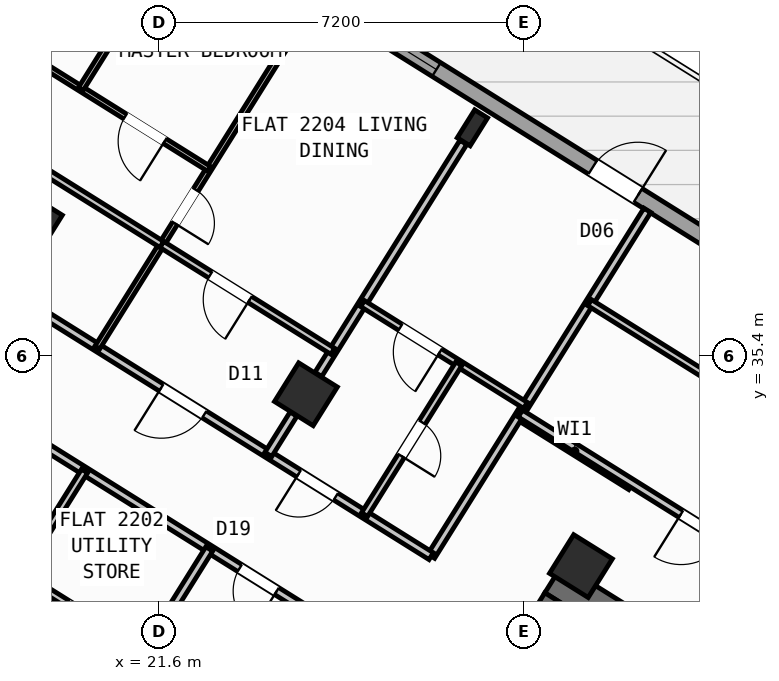
"""IFC4 building model, lengths in metres.
Left out: names, types, materials, properties, quantities, classifications, styles, units other than length and angle.
Written with IfcOpenShell. Run it as: python <this file> out.ifc"""

import sys

from ifc_helpers import new_model, si_unit, direction, frame, frame_2d, origin, origin_2d, place, context, subcontext, project, spatial, rectangle, hollow_rectangle, i_section, extrude, source, transform, mapped, element, fill, save


model = new_model("IFC4")
c1 = context("Model", 3, precision=1e-05, world=origin(), true_north=direction((0.0, 1.0)))
c2 = subcontext(c1, "Body", "Model", "MODEL_VIEW")
j1 = project(units=[si_unit("LENGTHUNIT", "METRE"), si_unit("PLANEANGLEUNIT", "RADIAN")], contexts=[c1])
p1 = place(None, origin())
s1 = spatial("IfcSite", under=j1, at=p1, CompositionType="ELEMENT")
p2 = place(p1, origin())
s2 = spatial("IfcBuilding", under=s1, at=p2, CompositionType="ELEMENT")
p3 = place(p2, frame((0.0, 0.0, 90.0)))
s3 = spatial("IfcBuildingStorey", under=s2, at=p3, CompositionType="ELEMENT", Elevation=90.0)
p4 = place(p3, frame((40.615, 23.983, 0.0), z_axis=(0.0, 0.0, 1.0), x_axis=(-0.848045953968, 0.529922692436, 0.0)))
e1 = element("IfcWall", 1, at=p4, inside=s3, PredefinedType="SHEAR", context=c2, shape_type="SweptSolid", body=[
    extrude(rectangle(XDim=13.24, YDim=0.65, at=frame_2d((6.62, 0.0))), origin(), (0.0, 0.0, 1.0), 3.35),
])
p5 = place(p3, frame((29.491, 30.552, 0.0), z_axis=(0.0, 0.0, 1.0), x_axis=(-0.529893103397, -0.8480644427, 0.0)))
e2 = element("IfcWall", 2, at=p5, inside=s3, PredefinedType="SHEAR", context=c2, shape_type="SweptSolid", body=[
    extrude(rectangle(XDim=3.525, YDim=0.65, at=frame_2d((1.763, 0.0))), origin(), (0.0, 0.0, 1.0), 3.35),
])
m1 = source(origin(), c2, "Body", "SweptSolid", [
    extrude(hollow_rectangle(XDim=0.9, YDim=0.9, WallThickness=0.036, at=origin_2d()), origin(), (0.0, 0.0, 1.0), 3.6),
])
p6 = place(p3, frame((29.928, 31.251, 0.0), z_axis=(0.0, 0.0, 1.0), x_axis=(-0.848048096156, 0.529919264233, 0.0)))
e3 = element("IfcColumn", 3, at=p6, inside=s3, PredefinedType="COLUMN", context=c2, shape_type="MappedRepresentation", body=[
    mapped(m1, transform((0.0, 0.0, 0.0), scale=1.0)),
])
m2 = source(origin(), c2, "Body", "SweptSolid", [
    extrude(i_section(OverallWidth=0.3, OverallDepth=0.65, WebThickness=0.016, FlangeThickness=0.031, at=origin_2d()), origin(), (0.0, 0.0, 1.0), 3.6),
])
p7 = place(p3, frame((27.786, 39.901, 0.0), z_axis=(0.0, 0.0, 1.0), x_axis=(-0.848048096156, 0.529919264233, 0.0)))
e4 = element("IfcColumn", 4, at=p7, inside=s3, PredefinedType="COLUMN", context=c2, shape_type="MappedRepresentation", body=[
    mapped(m2, transform((0.0, 0.0, 0.0), scale=1.0)),
])
for number, where, z_axis, x_axis in (
    (5, (24.5, 34.643, 0.0), (0.0, 0.0, 1.0), (-0.848, 0.53, 0.0)),
    (6, (19.073, 38.034, 0.0), (0.0, 0.0, 1.0), (-0.848, 0.53, 0.0)),
):
    element("IfcColumn", number, at=place(p3, frame(where, z_axis=z_axis, x_axis=x_axis)), inside=s3, PredefinedType="COLUMN", context=c2, shape_type="MappedRepresentation", body=[
        mapped(m1, transform((0.0, 0.0, 0.0), scale=1.0)),
    ])
p8 = place(p3, frame((17.424, 47.083, 0.0), z_axis=(0.0, 0.0, 1.0), x_axis=(0.848049927979, -0.529916332693, 0.0)))
e7 = element("IfcWall", 7, at=p8, inside=s3, PredefinedType="STANDARD", context=c2, shape_type="SweptSolid", body=[
    extrude(rectangle(XDim=29.223, YDim=0.32, at=frame_2d((14.612, 0.0))), origin(), (0.0, 0.0, 1.0), 3.35),
])
p9 = place(p8, frame((15.02, 0.0, 0.0)))
e8 = element("IfcOpeningElement", 8, at=p9, cuts=e7, PredefinedType="OPENING", context=c2, shape_type="SweptSolid", body=[
    extrude(rectangle(XDim=1.05, YDim=2.15, at=frame_2d((0.525, 1.075))), frame((0.0, 0.17, 0.0), z_axis=(0.0, -1.0, 0.0), x_axis=(1.0, 0.0, 0.0)), (0.0, 0.0, 1.0), 0.34),
])
p10 = place(p8, frame((20.869, 0.0, 0.8)))
e9 = element("IfcOpeningElement", 9, at=p10, cuts=e7, PredefinedType="OPENING", context=c2, shape_type="SweptSolid", body=[
    extrude(rectangle(XDim=2.1, YDim=1.55, at=frame_2d((1.05, 0.775))), frame((0.0, 0.17, 0.0), z_axis=(0.0, -1.0, 0.0), x_axis=(1.0, 0.0, 0.0)), (0.0, 0.0, 1.0), 0.34),
])
p11 = place(p8, frame((25.438, 0.0, 0.8)))
e10 = element("IfcOpeningElement", 10, at=p11, cuts=e7, PredefinedType="OPENING", context=c2, shape_type="SweptSolid", body=[
    extrude(rectangle(XDim=2.1, YDim=1.55, at=frame_2d((1.05, 0.775))), frame((0.0, 0.17, 0.0), z_axis=(0.0, -1.0, 0.0), x_axis=(1.0, 0.0, 0.0)), (0.0, 0.0, 1.0), 0.34),
])
p12 = place(p8, frame((10.481, 0.0, 1.0)))
e11 = element("IfcOpeningElement", 11, at=p12, cuts=e7, PredefinedType="OPENING", context=c2, shape_type="SweptSolid", body=[
    extrude(rectangle(XDim=0.9, YDim=1.25, at=frame_2d((0.45, 0.625))), frame((0.0, 0.17, 0.0), z_axis=(0.0, -1.0, 0.0), x_axis=(1.0, 0.0, 0.0)), (0.0, 0.0, 1.0), 0.34),
])
p13 = place(p8, frame((6.674, 0.0, 1.0)))
e12 = element("IfcOpeningElement", 12, at=p13, cuts=e7, PredefinedType="OPENING", context=c2, shape_type="SweptSolid", body=[
    extrude(rectangle(XDim=0.9, YDim=1.25, at=frame_2d((0.45, 0.625))), frame((0.0, 0.17, 0.0), z_axis=(0.0, -1.0, 0.0), x_axis=(1.0, 0.0, 0.0)), (0.0, 0.0, 1.0), 0.34),
])
p14 = place(p8, frame((3.694, 0.0, 1.0)))
e13 = element("IfcOpeningElement", 13, at=p14, cuts=e7, PredefinedType="OPENING", context=c2, shape_type="SweptSolid", body=[
    extrude(rectangle(XDim=0.9, YDim=1.25, at=frame_2d((0.45, 0.625))), frame((0.0, 0.17, 0.0), z_axis=(0.0, -1.0, 0.0), x_axis=(1.0, 0.0, 0.0)), (0.0, 0.0, 1.0), 0.34),
])
p15 = place(p3, frame((30.914, 32.829, 0.0), z_axis=(0.0, 0.0, 1.0), x_axis=(-0.848008813643, 0.529982124211, 0.0)))
e14 = element("IfcWall", 14, at=p15, inside=s3, PredefinedType="PARTITIONING", context=c2, shape_type="SweptSolid", body=[
    extrude(rectangle(XDim=2.61, YDim=0.16, at=frame_2d((1.305, 0.0))), origin(), (0.0, 0.0, 1.0), 3.34),
])
p16 = place(p3, frame((31.239, 38.274, 0.0), z_axis=(0.0, 0.0, 1.0), x_axis=(-0.529928058306, -0.848042600947, 0.0)))
e15 = element("IfcWall", 15, at=p16, inside=s3, PredefinedType="PARTITIONING", context=c2, shape_type="SweptSolid", body=[
    extrude(rectangle(XDim=8.05, YDim=0.16, at=frame_2d((4.025, 0.0))), origin(), (0.0, 0.0, 1.0), 3.34),
])
p17 = place(p3, frame((26.973, 31.447, 0.0), z_axis=(0.0, 0.0, 1.0), x_axis=(-0.848048310262, 0.529918921593, 0.0)))
e16 = element("IfcWall", 16, at=p17, inside=s3, PredefinedType="PARTITIONING", context=c2, shape_type="SweptSolid", body=[
    extrude(rectangle(XDim=16.73, YDim=0.16, at=frame_2d((8.365, 0.0))), origin(), (0.0, 0.0, 1.0), 3.34),
])
p18 = place(p17, frame((2.22, 0.0, 0.0)))
e17 = element("IfcOpeningElement", 17, at=p18, cuts=e16, PredefinedType="OPENING", context=c2, shape_type="SweptSolid", body=[
    extrude(rectangle(XDim=0.86, YDim=2.05, at=frame_2d((0.43, 1.025))), frame((0.0, 0.09, 0.0), z_axis=(0.0, -1.0, 0.0), x_axis=(1.0, 0.0, 0.0)), (0.0, 0.0, 1.0), 0.18),
])
p19 = place(p17, frame((5.28, 0.0, 0.0)))
e18 = element("IfcOpeningElement", 18, at=p19, cuts=e16, PredefinedType="OPENING", context=c2, shape_type="SweptSolid", body=[
    extrude(rectangle(XDim=1.0, YDim=2.1, at=frame_2d((0.5, 1.05))), frame((0.0, 0.09, 0.0), z_axis=(0.0, -1.0, 0.0), x_axis=(1.0, 0.0, 0.0)), (0.0, 0.0, 1.0), 0.18),
])
p20 = place(p3, frame((25.807, 29.582, 0.0), z_axis=(0.0, 0.0, 1.0), x_axis=(-0.848052408131, 0.529912363569, 0.0)))
e19 = element("IfcWall", 19, at=p20, inside=s3, PredefinedType="PARTITIONING", context=c2, shape_type="SweptSolid", body=[
    extrude(rectangle(XDim=16.73, YDim=0.16, at=frame_2d((8.365, 0.0))), origin(), (0.0, 0.0, 1.0), 3.34),
])
p21 = place(p20, frame((2.22, 0.0, 0.0)))
e20 = element("IfcOpeningElement", 20, at=p21, cuts=e19, PredefinedType="OPENING", context=c2, shape_type="SweptSolid", body=[
    extrude(rectangle(XDim=0.86, YDim=2.05, at=frame_2d((0.43, 1.025))), frame((0.0, 0.09, 0.0), z_axis=(0.0, -1.0, 0.0), x_axis=(1.0, 0.0, 0.0)), (0.0, 0.0, 1.0), 0.18),
])
p22 = place(p20, frame((14.013, 0.0, 0.0)))
e21 = element("IfcOpeningElement", 21, at=p22, cuts=e19, PredefinedType="OPENING", context=c2, shape_type="SweptSolid", body=[
    extrude(rectangle(XDim=1.0, YDim=2.1, at=frame_2d((0.5, 1.05))), frame((0.0, 0.09, 0.0), z_axis=(0.0, -1.0, 0.0), x_axis=(1.0, 0.0, 0.0)), (0.0, 0.0, 1.0), 0.18),
])
p23 = place(p3, frame((22.593, 31.59, 0.0), z_axis=(0.0, 0.0, 1.0), x_axis=(-0.529924383291, -0.848044897393, 0.0)))
e22 = element("IfcWall", 22, at=p23, inside=s3, PredefinedType="PARTITIONING", context=c2, shape_type="SweptSolid", body=[
    extrude(rectangle(XDim=3.238, YDim=0.16, at=frame_2d((1.619, 0.0))), origin(), (0.0, 0.0, 1.0), 2.775),
])
p24 = place(p3, frame((21.321, 29.554, 0.0), z_axis=(0.0, 0.0, 1.0), x_axis=(-0.84803529765, 0.529939745575, 0.0)))
e23 = element("IfcWall", 23, at=p24, inside=s3, PredefinedType="PLUMBINGWALL", context=c2, shape_type="SweptSolid", body=[
    extrude(rectangle(XDim=8.527, YDim=0.14, at=frame_2d((4.264, 0.0))), origin(), (0.0, 0.0, 1.0), 3.34),
])
p25 = place(p24, frame((5.155, 0.0, 0.0)))
e24 = element("IfcOpeningElement", 24, at=p25, cuts=e23, PredefinedType="OPENING", context=c2, shape_type="SweptSolid", body=[
    extrude(rectangle(XDim=0.78, YDim=2.05, at=frame_2d((0.39, 1.025))), frame((0.0, 0.08, 0.0), z_axis=(0.0, -1.0, 0.0), x_axis=(1.0, 0.0, 0.0)), (0.0, 0.0, 1.0), 0.16),
])
p26 = place(p24, frame((1.011, 0.0, 0.0)))
e25 = element("IfcOpeningElement", 25, at=p26, cuts=e23, PredefinedType="OPENING", context=c2, shape_type="SweptSolid", body=[
    extrude(rectangle(XDim=0.78, YDim=2.05, at=frame_2d((0.39, 1.025))), frame((0.0, 0.08, 0.0), z_axis=(0.0, -1.0, 0.0), x_axis=(1.0, 0.0, 0.0)), (0.0, 0.0, 1.0), 0.16),
])
p27 = place(p3, frame((20.132, 33.128, 0.0), z_axis=(0.0, 0.0, 1.0), x_axis=(-0.529935194983, -0.848038141311, 0.0)))
e26 = element("IfcWall", 26, at=p27, inside=s3, PredefinedType="PLUMBINGWALL", context=c2, shape_type="SweptSolid", body=[
    extrude(rectangle(XDim=2.41, YDim=0.14, at=frame_2d((1.205, 0.0))), origin(), (0.0, 0.0, 1.0), 3.34),
])
p28 = place(p3, frame((20.272, 27.875, 0.0), z_axis=(0.0, 0.0, 1.0), x_axis=(-0.848056204746, 0.529906287557, 0.0)))
e27 = element("IfcWall", 27, at=p28, inside=s3, PredefinedType="PARTITIONING", context=c2, shape_type="SweptSolid", body=[
    extrude(rectangle(XDim=8.527, YDim=0.11, at=frame_2d((4.264, 0.0))), origin(), (0.0, 0.0, 1.0), 3.34),
])
p29 = place(p28, frame((0.606, 0.0, 0.0)))
e28 = element("IfcOpeningElement", 28, at=p29, cuts=e27, PredefinedType="OPENING", context=c2, shape_type="SweptSolid", body=[
    extrude(rectangle(XDim=0.92, YDim=2.08, at=frame_2d((0.46, 1.04))), frame((0.0, 0.065, 0.0), z_axis=(0.0, -1.0, 0.0), x_axis=(1.0, 0.0, 0.0)), (0.0, 0.0, 1.0), 0.13),
])
p30 = place(p28, frame((2.738, 0.0, 0.0)))
e29 = element("IfcOpeningElement", 29, at=p30, cuts=e27, PredefinedType="OPENING", context=c2, shape_type="SweptSolid", body=[
    extrude(rectangle(XDim=0.92, YDim=2.08, at=frame_2d((0.46, 1.04))), frame((0.0, 0.065, 0.0), z_axis=(0.0, -1.0, 0.0), x_axis=(1.0, 0.0, 0.0)), (0.0, 0.0, 1.0), 0.13),
])
p31 = place(p28, frame((4.869, 0.0, 0.0)))
e30 = element("IfcOpeningElement", 30, at=p31, cuts=e27, PredefinedType="OPENING", context=c2, shape_type="SweptSolid", body=[
    extrude(rectangle(XDim=0.92, YDim=2.08, at=frame_2d((0.46, 1.04))), frame((0.0, 0.065, 0.0), z_axis=(0.0, -1.0, 0.0), x_axis=(1.0, 0.0, 0.0)), (0.0, 0.0, 1.0), 0.13),
])
p32 = place(p28, frame((7.001, 0.0, 0.0)))
e31 = element("IfcOpeningElement", 31, at=p32, cuts=e27, PredefinedType="OPENING", context=c2, shape_type="SweptSolid", body=[
    extrude(rectangle(XDim=0.92, YDim=2.08, at=frame_2d((0.46, 1.04))), frame((0.0, 0.065, 0.0), z_axis=(0.0, -1.0, 0.0), x_axis=(1.0, 0.0, 0.0)), (0.0, 0.0, 1.0), 0.13),
])
p33 = place(p3, frame((27.607, 39.615, 0.0), z_axis=(0.0, 0.0, 1.0), x_axis=(-0.529913610495, -0.848051628978, 0.0)))
e32 = element("IfcWall", 32, at=p33, inside=s3, PredefinedType="PARTITIONING", context=c2, shape_type="SweptSolid", body=[
    extrude(rectangle(XDim=5.401, YDim=0.16, at=frame_2d((2.7, 0.0))), origin(), (0.0, 0.0, 1.0), 2.775),
])
p34 = place(p3, frame((24.256, 34.251, 0.0), z_axis=(0.0, 0.0, 1.0), x_axis=(-0.529952145338, -0.848027548876, 0.0)))
e33 = element("IfcWall", 33, at=p34, inside=s3, PredefinedType="PARTITIONING", context=c2, shape_type="SweptSolid", body=[
    extrude(rectangle(XDim=0.938, YDim=0.16, at=frame_2d((0.469, 0.0))), origin(), (0.0, 0.0, 1.0), 2.775),
])
p35 = place(p3, frame((28.833, 34.424, 0.0), z_axis=(0.0, 0.0, 1.0), x_axis=(-0.848059820872, 0.529900500304, 0.0)))
e34 = element("IfcWall", 34, at=p35, inside=s3, PredefinedType="PLUMBINGWALL", context=c2, shape_type="SweptSolid", body=[
    extrude(rectangle(XDim=3.79, YDim=0.14, at=frame_2d((1.895, 0.0))), origin(), (0.0, 0.0, 1.0), 3.34),
])
p36 = place(p35, frame((1.99, 0.0, 0.0)))
e35 = element("IfcOpeningElement", 35, at=p36, cuts=e34, PredefinedType="OPENING", context=c2, shape_type="SweptSolid", body=[
    extrude(rectangle(XDim=0.92, YDim=2.08, at=frame_2d((0.46, 1.04))), frame((0.0, 0.08, 0.0), z_axis=(0.0, -1.0, 0.0), x_axis=(1.0, 0.0, 0.0)), (0.0, 0.0, 1.0), 0.16),
])
p37 = place(p3, frame((27.518, 35.245, 0.0), z_axis=(0.0, 0.0, 1.0), x_axis=(-0.529948921118, -0.848029563757, 0.0)))
e36 = element("IfcWall", 36, at=p37, inside=s3, PredefinedType="PLUMBINGWALL", context=c2, shape_type="SweptSolid", body=[
    extrude(rectangle(XDim=3.51, YDim=0.14, at=frame_2d((1.755, 0.0))), origin(), (0.0, 0.0, 1.0), 2.995),
])
p38 = place(p37, frame((1.365, 0.0, 0.0)))
e37 = element("IfcOpeningElement", 37, at=p38, cuts=e36, PredefinedType="OPENING", context=c2, shape_type="SweptSolid", body=[
    extrude(rectangle(XDim=0.78, YDim=2.05, at=frame_2d((0.39, 1.025))), frame((0.0, 0.08, 0.0), z_axis=(0.0, -1.0, 0.0), x_axis=(1.0, 0.0, 0.0)), (0.0, 0.0, 1.0), 0.16),
])
p39 = place(p3, frame((24.792, 42.62, 0.0), z_axis=(0.0, 0.0, 1.0), x_axis=(-0.529925083182, -0.848044460046, 0.0)))
e38 = element("IfcWall", 38, at=p39, inside=s3, PredefinedType="PARTITIONING", context=c2, shape_type="SweptSolid", body=[
    extrude(rectangle(XDim=8.32, YDim=0.11, at=frame_2d((4.16, 0.0))), origin(), (0.0, 0.0, 1.0), 3.34),
])
p40 = place(p39, frame((4.65, 0.0, 0.0)))
e39 = element("IfcOpeningElement", 39, at=p40, cuts=e38, PredefinedType="OPENING", context=c2, shape_type="SweptSolid", body=[
    extrude(rectangle(XDim=0.78, YDim=2.05, at=frame_2d((0.39, 1.025))), frame((0.0, 0.065, 0.0), z_axis=(0.0, -1.0, 0.0), x_axis=(1.0, 0.0, 0.0)), (0.0, 0.0, 1.0), 0.13),
])
p41 = place(p3, frame((25.03, 35.491, 0.0), z_axis=(0.0, 0.0, 1.0), x_axis=(-0.848070667369, 0.52988314103, 0.0)))
e40 = element("IfcWall", 40, at=p41, inside=s3, PredefinedType="PLUMBINGWALL", context=c2, shape_type="SweptSolid", body=[
    extrude(rectangle(XDim=3.98, YDim=0.14, at=frame_2d((1.99, 0.0))), origin(), (0.0, 0.0, 1.0), 3.34),
])
p42 = place(p41, frame((1.93, 0.0, 0.0)))
e41 = element("IfcOpeningElement", 41, at=p42, cuts=e40, PredefinedType="OPENING", context=c2, shape_type="SweptSolid", body=[
    extrude(rectangle(XDim=0.92, YDim=2.08, at=frame_2d((0.46, 1.04))), frame((0.0, 0.08, 0.0), z_axis=(0.0, -1.0, 0.0), x_axis=(1.0, 0.0, 0.0)), (0.0, 0.0, 1.0), 0.16),
])
p43 = place(p3, frame((21.655, 37.6, 0.0), z_axis=(0.0, 0.0, 1.0), x_axis=(-0.848044326704, 0.52992529657, 0.0)))
e42 = element("IfcWall", 42, at=p43, inside=s3, PredefinedType="PLUMBINGWALL", context=c2, shape_type="SweptSolid", body=[
    extrude(rectangle(XDim=8.94, YDim=0.14, at=frame_2d((4.47, 0.0))), origin(), (0.0, 0.0, 1.0), 3.34),
])
p44 = place(p43, frame((2.972, 0.0, 0.0)))
e43 = element("IfcOpeningElement", 43, at=p44, cuts=e42, PredefinedType="OPENING", context=c2, shape_type="SweptSolid", body=[
    extrude(rectangle(XDim=0.78, YDim=2.05, at=frame_2d((0.39, 1.025))), frame((0.0, 0.08, 0.0), z_axis=(0.0, -1.0, 0.0), x_axis=(1.0, 0.0, 0.0)), (0.0, 0.0, 1.0), 0.16),
])
p45 = place(p43, frame((6.843, 0.0, 0.0)))
e44 = element("IfcOpeningElement", 44, at=p45, cuts=e42, PredefinedType="OPENING", context=c2, shape_type="SweptSolid", body=[
    extrude(rectangle(XDim=0.78, YDim=2.05, at=frame_2d((0.39, 1.025))), frame((0.0, 0.08, 0.0), z_axis=(0.0, -1.0, 0.0), x_axis=(1.0, 0.0, 0.0)), (0.0, 0.0, 1.0), 0.16),
])
p46 = place(p3, frame((22.588, 39.093, 0.0), z_axis=(0.0, 0.0, 1.0), x_axis=(-0.848044326704, 0.52992529657, 0.0)))
e45 = element("IfcWall", 45, at=p46, inside=s3, PredefinedType="PARTITIONING", context=c2, shape_type="SweptSolid", body=[
    extrude(rectangle(XDim=8.94, YDim=0.11, at=frame_2d((4.47, 0.0))), origin(), (0.0, 0.0, 1.0), 3.34),
])
p47 = place(p46, frame((1.03, 0.0, 0.0)))
e46 = element("IfcOpeningElement", 46, at=p47, cuts=e45, PredefinedType="OPENING", context=c2, shape_type="SweptSolid", body=[
    extrude(rectangle(XDim=0.92, YDim=2.08, at=frame_2d((0.46, 1.04))), frame((0.0, 0.065, 0.0), z_axis=(0.0, -1.0, 0.0), x_axis=(1.0, 0.0, 0.0)), (0.0, 0.0, 1.0), 0.13),
])
p48 = place(p46, frame((4.01, 0.0, 0.0)))
e47 = element("IfcOpeningElement", 47, at=p48, cuts=e45, PredefinedType="OPENING", context=c2, shape_type="SweptSolid", body=[
    extrude(rectangle(XDim=0.92, YDim=2.08, at=frame_2d((0.46, 1.04))), frame((0.0, 0.065, 0.0), z_axis=(0.0, -1.0, 0.0), x_axis=(1.0, 0.0, 0.0)), (0.0, 0.0, 1.0), 0.13),
])
p49 = place(p46, frame((6.99, 0.0, 0.0)))
e48 = element("IfcOpeningElement", 48, at=p49, cuts=e45, PredefinedType="OPENING", context=c2, shape_type="SweptSolid", body=[
    extrude(rectangle(XDim=0.92, YDim=2.08, at=frame_2d((0.46, 1.04))), frame((0.0, 0.065, 0.0), z_axis=(0.0, -1.0, 0.0), x_axis=(1.0, 0.0, 0.0)), (0.0, 0.0, 1.0), 0.13),
])
p50 = place(p3, frame((22.265, 44.199, 0.0), z_axis=(0.0, 0.0, 1.0), x_axis=(-0.529946186362, -0.848031272749, 0.0)))
e49 = element("IfcWall", 49, at=p50, inside=s3, PredefinedType="PARTITIONING", context=c2, shape_type="SweptSolid", body=[
    extrude(rectangle(XDim=4.16, YDim=0.11, at=frame_2d((2.08, 0.0))), origin(), (0.0, 0.0, 1.0), 3.34),
])
p51 = place(p3, frame((41.936, 26.012, 0.0), z_axis=(0.0, 0.0, 1.0), x_axis=(-0.848051154596, 0.529914369676, 0.0)))
e50 = element("IfcWall", 50, at=p51, inside=s3, PredefinedType="PARTITIONING", context=c2, shape_type="SweptSolid", body=[
    extrude(rectangle(XDim=15.57, YDim=0.16, at=frame_2d((7.785, 0.0))), origin(), (0.0, 0.0, 1.0), 3.34),
])
p52 = place(p51, frame((10.83, 0.0, 0.0)))
e51 = element("IfcOpeningElement", 51, at=p52, cuts=e50, PredefinedType="OPENING", context=c2, shape_type="SweptSolid", body=[
    extrude(rectangle(XDim=1.0, YDim=2.1, at=frame_2d((0.5, 1.05))), frame((0.0, 0.09, 0.0), z_axis=(0.0, -1.0, 0.0), x_axis=(1.0, 0.0, 0.0)), (0.0, 0.0, 1.0), 0.18),
])
p53 = place(p3, frame((42.226, 28.873, 0.0), z_axis=(0.0, 0.0, 1.0), x_axis=(-0.848049134363, 0.529917602752, 0.0)))
e52 = element("IfcWall", 52, at=p53, inside=s3, PredefinedType="PLUMBINGWALL", context=c2, shape_type="SweptSolid", body=[
    extrude(rectangle(XDim=14.3, YDim=0.14, at=frame_2d((7.15, 0.0))), origin(), (0.0, 0.0, 1.0), 3.34),
])
p54 = place(p53, frame((9.57, 0.0, 0.0)))
e53 = element("IfcOpeningElement", 53, at=p54, cuts=e52, PredefinedType="OPENING", context=c2, shape_type="SweptSolid", body=[
    extrude(rectangle(XDim=0.92, YDim=2.08, at=frame_2d((0.46, 1.04))), frame((0.0, 0.08, 0.0), z_axis=(0.0, -1.0, 0.0), x_axis=(1.0, 0.0, 0.0)), (0.0, 0.0, 1.0), 0.16),
])
m3 = source(origin(), c2, "Body", "SweptSolid", [
    extrude(rectangle(XDim=1.05, YDim=2.15, at=frame_2d((0.525, 1.075))), frame((0.0, 0.025, 0.0), z_axis=(0.0, -1.0, 0.0), x_axis=(1.0, 0.0, 0.0)), (0.0, 0.0, 1.0), 0.05),
])
p55 = place(p9, origin())
e54 = element("IfcDoor", 54, at=p55, inside=s3, OperationType="SINGLE_SWING_RIGHT", PredefinedType="DOOR", context=c2, shape_type="MappedRepresentation", body=[
    mapped(m3, transform((0.0, 0.0, 0.0), scale=1.0)),
])
fill(e8, e54)
m4 = source(origin(), c2, "Body", "SweptSolid", [
    extrude(rectangle(XDim=0.9, YDim=1.25, at=frame_2d((0.45, 0.625))), frame((0.0, 0.03, 0.0), z_axis=(0.0, -1.0, 0.0), x_axis=(1.0, 0.0, 0.0)), (0.0, 0.0, 1.0), 0.06),
])
p56 = place(p12, origin())
e55 = element("IfcWindow", 55, at=p56, inside=s3, PartitioningType="SINGLE_PANEL", PredefinedType="WINDOW", context=c2, shape_type="MappedRepresentation", body=[
    mapped(m4, transform((0.0, 0.0, 0.0), scale=1.0)),
])
fill(e11, e55)
m5 = source(origin(), c2, "Body", "SweptSolid", [
    extrude(rectangle(XDim=0.86, YDim=2.05, at=frame_2d((0.43, 1.025))), frame((0.0, 0.025, 0.0), z_axis=(0.0, -1.0, 0.0), x_axis=(1.0, 0.0, 0.0)), (0.0, 0.0, 1.0), 0.05),
])
p57 = place(p21, origin())
e56 = element("IfcDoor", 56, at=p57, inside=s3, OperationType="SINGLE_SWING_LEFT", PredefinedType="DOOR", context=c2, shape_type="MappedRepresentation", body=[
    mapped(m5, transform((0.0, 0.0, 0.0), scale=1.0)),
])
fill(e20, e56)
p58 = place(p18, origin())
e57 = element("IfcDoor", 57, at=p58, inside=s3, OperationType="SINGLE_SWING_RIGHT", PredefinedType="DOOR", context=c2, shape_type="MappedRepresentation", body=[
    mapped(m5, transform((0.0, 0.0, 0.0), scale=1.0)),
])
fill(e17, e57)
m6 = source(origin(), c2, "Body", "SweptSolid", [
    extrude(rectangle(XDim=0.92, YDim=2.08, at=frame_2d((0.46, 1.04))), frame((0.0, 0.025, 0.0), z_axis=(0.0, -1.0, 0.0), x_axis=(1.0, 0.0, 0.0)), (0.0, 0.0, 1.0), 0.05),
])
p59 = place(p36, origin())
e58 = element("IfcDoor", 58, at=p59, inside=s3, OperationType="SINGLE_SWING_LEFT", PredefinedType="DOOR", context=c2, shape_type="MappedRepresentation", body=[
    mapped(m6, transform((0.0, 0.0, 0.0), scale=1.0)),
])
fill(e35, e58)
m7 = source(origin(), c2, "Body", "SweptSolid", [
    extrude(rectangle(XDim=0.78, YDim=2.05, at=frame_2d((0.39, 1.025))), frame((0.0, 0.025, 0.0), z_axis=(0.0, -1.0, 0.0), x_axis=(1.0, 0.0, 0.0)), (0.0, 0.0, 1.0), 0.05),
])
p60 = place(p38, origin())
e59 = element("IfcDoor", 59, at=p60, inside=s3, OperationType="SINGLE_SWING_RIGHT", PredefinedType="DOOR", context=c2, shape_type="MappedRepresentation", body=[
    mapped(m7, transform((0.0, 0.0, 0.0), scale=1.0)),
])
fill(e37, e59)
m8 = source(origin(), c2, "Body", "SweptSolid", [
    extrude(rectangle(XDim=1.0, YDim=2.1, at=frame_2d((0.5, 1.05))), frame((0.0, 0.025, 0.0), z_axis=(0.0, -1.0, 0.0), x_axis=(1.0, 0.0, 0.0)), (0.0, 0.0, 1.0), 0.05),
])
p61 = place(p19, origin())
e60 = element("IfcDoor", 60, at=p61, inside=s3, OperationType="SINGLE_SWING_RIGHT", PredefinedType="DOOR", context=c2, shape_type="MappedRepresentation", body=[
    mapped(m8, transform((0.0, 0.0, 0.0), scale=1.0)),
])
fill(e18, e60)
p62 = place(p42, origin())
e61 = element("IfcDoor", 61, at=p62, inside=s3, OperationType="SINGLE_SWING_LEFT", PredefinedType="DOOR", context=c2, shape_type="MappedRepresentation", body=[
    mapped(m6, transform((0.0, 0.0, 0.0), scale=1.0)),
])
fill(e41, e61)
p63 = place(p40, origin())
e62 = element("IfcDoor", 62, at=p63, inside=s3, OperationType="SINGLE_SWING_RIGHT", PredefinedType="DOOR", context=c2, shape_type="MappedRepresentation", body=[
    mapped(m7, transform((0.0, 0.0, 0.0), scale=1.0)),
])
fill(e39, e62)
p64 = place(p47, origin())
e63 = element("IfcDoor", 63, at=p64, inside=s3, OperationType="SINGLE_SWING_LEFT", PredefinedType="DOOR", context=c2, shape_type="MappedRepresentation", body=[
    mapped(m6, transform((0.0, 0.0, 0.0), scale=1.0)),
])
fill(e46, e63)
p65 = place(p52, origin())
e64 = element("IfcDoor", 64, at=p65, inside=s3, OperationType="SINGLE_SWING_RIGHT", PredefinedType="DOOR", context=c2, shape_type="MappedRepresentation", body=[
    mapped(m8, transform((0.0, 0.0, 0.0), scale=1.0)),
])
fill(e51, e64)
save(model, sys.argv[1])
